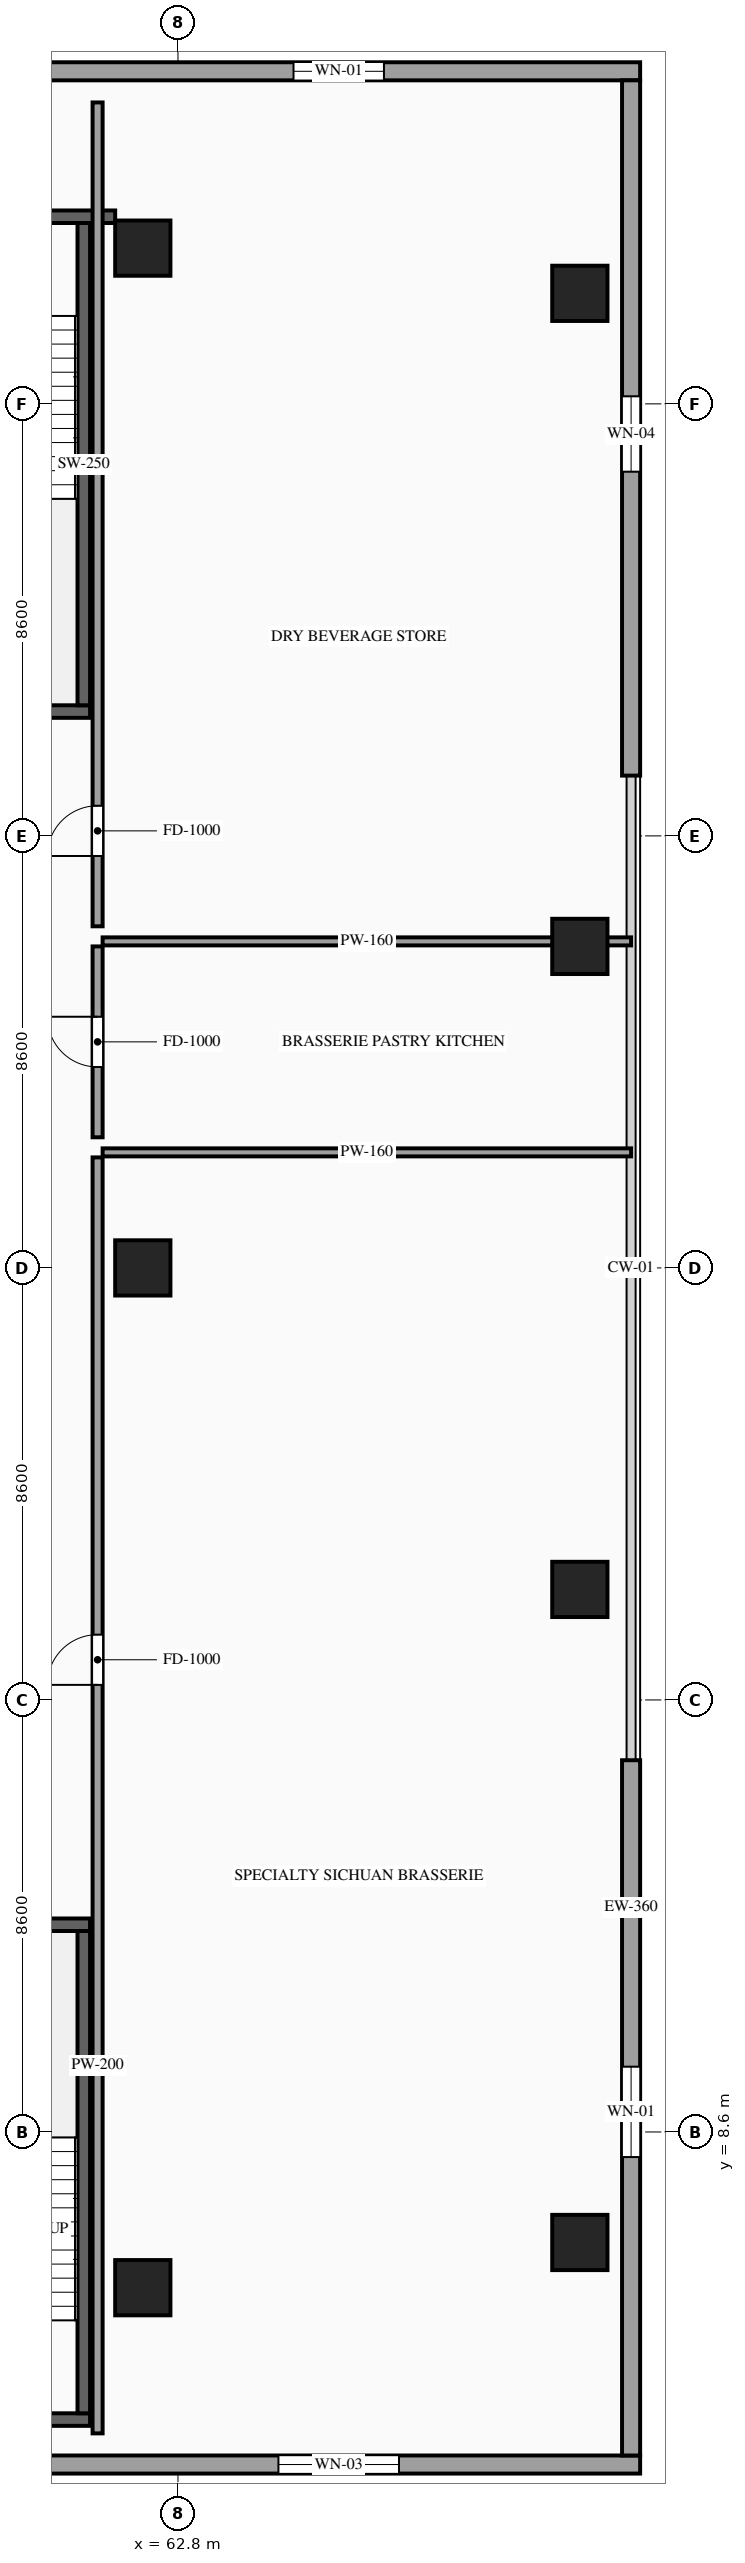
"""IFC4 building model, lengths in metres.
Left out: names, types, materials, properties, quantities, classifications, styles, units other than length and angle.
Written with IfcOpenShell. Run it as: python <this file> out.ifc"""

import sys

from ifc_helpers import new_model, si_unit, direction, frame, frame_2d, origin, origin_2d, place, context, subcontext, project, spatial, rectangle, extrude, source, transform, mapped, element, fill, save


model = new_model("IFC4")
c1 = context("Model", 3, precision=1e-05, world=origin(), true_north=direction((0.0, 1.0)))
c2 = subcontext(c1, "Body", "Model", "MODEL_VIEW")
j1 = project(units=[si_unit("LENGTHUNIT", "METRE"), si_unit("PLANEANGLEUNIT", "RADIAN")], contexts=[c1])
p1 = place(None, origin())
s1 = spatial("IfcSite", under=j1, at=p1, CompositionType="ELEMENT")
p2 = place(p1, origin())
s2 = spatial("IfcBuilding", under=s1, at=p2, CompositionType="ELEMENT")
p3 = place(p2, frame((0.0, 0.0, 10.2)))
s3 = spatial("IfcBuildingStorey", under=s2, at=p3, CompositionType="ELEMENT", Elevation=10.2)
m1 = source(origin(), c2, "Body", "SweptSolid", [
    extrude(rectangle(XDim=1.1, YDim=1.1, at=origin_2d()), origin(), (0.0, 0.0, 1.0), 4.8),
])
for number, where, z_axis, x_axis in (
    (1, (70.8, 6.4, 0.0), (0.0, 0.0, 1.0), (1.0, 0.0, 0.0)),
    (2, (70.8, 19.4, 0.0), (0.0, 0.0, 1.0), (1.0, 0.0, 0.0)),
    (3, (70.8, 32.2, 0.0), (0.0, 0.0, 1.0), (1.0, 0.0, 0.0)),
    (4, (70.8, 45.2, 0.0), (0.0, 0.0, 1.0), (1.0, 0.0, 0.0)),
    (5, (62.1, 5.5, 0.0), (0.0, 0.0, 1.0), (1.0, 0.0, 0.0)),
    (6, (62.1, 25.8, 0.0), (0.0, 0.0, 1.0), (1.0, 0.0, 0.0)),
    (7, (62.1, 46.1, 0.0), (0.0, 0.0, 1.0), (1.0, 0.0, 0.0)),
):
    element("IfcColumn", number, at=place(p3, frame(where, z_axis=z_axis, x_axis=x_axis)), inside=s3, PredefinedType="COLUMN", context=c2, shape_type="MappedRepresentation", body=[
        mapped(m1, transform((0.0, 0.0, 0.0), scale=1.0)),
    ])
p4 = place(p3, frame((59.07, 1.98, 0.0), z_axis=(0.0, 0.0, 1.0), x_axis=(1.0, 0.0, 0.0)))
e8 = element("IfcWall", 8, at=p4, inside=s3, PredefinedType="SOLIDWALL", context=c2, shape_type="SweptSolid", body=[
    extrude(rectangle(XDim=12.93, YDim=0.36, at=frame_2d((6.465, 0.0))), origin(), (0.0, 0.0, 1.0), 4.52),
])
p5 = place(p4, frame((5.73, 0.0, 0.85)))
e9 = element("IfcOpeningElement", 9, at=p5, cuts=e8, PredefinedType="OPENING", context=c2, shape_type="SweptSolid", body=[
    extrude(rectangle(XDim=2.4, YDim=2.4, at=frame_2d((1.2, 1.2))), frame((0.0, 0.195, 0.0), z_axis=(0.0, -1.0, 0.0), x_axis=(1.0, 0.0, 0.0)), (0.0, 0.0, 1.0), 0.39),
])
p6 = place(p3, frame((59.07, 49.62, 0.0), z_axis=(0.0, 0.0, 1.0), x_axis=(1.0, 0.0, 0.0)))
e10 = element("IfcWall", 10, at=p6, inside=s3, PredefinedType="SOLIDWALL", context=c2, shape_type="SweptSolid", body=[
    extrude(rectangle(XDim=12.93, YDim=0.36, at=frame_2d((6.465, 0.0))), origin(), (0.0, 0.0, 1.0), 4.52),
])
p7 = place(p6, frame((6.03, 0.0, 0.9)))
e11 = element("IfcOpeningElement", 11, at=p7, cuts=e10, PredefinedType="OPENING", context=c2, shape_type="SweptSolid", body=[
    extrude(rectangle(XDim=1.8, YDim=2.2, at=frame_2d((0.9, 1.1))), frame((0.0, 0.195, 0.0), z_axis=(0.0, -1.0, 0.0), x_axis=(1.0, 0.0, 0.0)), (0.0, 0.0, 1.0), 0.39),
])
p8 = place(p3, frame((71.82, 2.16, 0.0), z_axis=(0.0, 0.0, 1.0), x_axis=(0.0, 1.0, 0.0)))
e12 = element("IfcWall", 12, at=p8, inside=s3, PredefinedType="SOLIDWALL", context=c2, shape_type="SweptSolid", body=[
    extrude(rectangle(XDim=13.84, YDim=0.36, at=frame_2d((6.92, 0.0))), origin(), (0.0, 0.0, 1.0), 4.52),
])
p9 = place(p8, frame((5.94, 0.0, 0.9)))
e13 = element("IfcOpeningElement", 13, at=p9, cuts=e12, PredefinedType="OPENING", context=c2, shape_type="SweptSolid", body=[
    extrude(rectangle(XDim=1.8, YDim=2.2, at=frame_2d((0.9, 1.1))), frame((0.0, 0.195, 0.0), z_axis=(0.0, -1.0, 0.0), x_axis=(1.0, 0.0, 0.0)), (0.0, 0.0, 1.0), 0.39),
])
p10 = place(p3, frame((71.82, 35.6, 0.0), z_axis=(0.0, 0.0, 1.0), x_axis=(0.0, 1.0, 0.0)))
e14 = element("IfcWall", 14, at=p10, inside=s3, PredefinedType="SOLIDWALL", context=c2, shape_type="SweptSolid", body=[
    extrude(rectangle(XDim=13.84, YDim=0.36, at=frame_2d((6.92, 0.0))), origin(), (0.0, 0.0, 1.0), 4.52),
])
p11 = place(p10, frame((6.05, 0.0, 0.9)))
e15 = element("IfcOpeningElement", 15, at=p11, cuts=e14, PredefinedType="OPENING", context=c2, shape_type="SweptSolid", body=[
    extrude(rectangle(XDim=1.5, YDim=1.8, at=frame_2d((0.75, 0.9))), frame((0.0, 0.195, 0.0), z_axis=(0.0, -1.0, 0.0), x_axis=(1.0, 0.0, 0.0)), (0.0, 0.0, 1.0), 0.39),
])
m2 = source(origin(), c2, "Body", "SweptSolid", [
    extrude(rectangle(XDim=4.3, YDim=0.25, at=frame_2d((2.15, 0.0))), origin(), (0.0, 0.0, 1.0), 4.52),
])
for number, where, z_axis, x_axis in (
    (16, (56.75, 2.875, 0.0), (0.0, 0.0, 1.0), (1.0, 0.0, 0.0)),
    (17, (56.75, 12.725, 0.0), (0.0, 0.0, 1.0), (1.0, 0.0, 0.0)),
):
    element("IfcWall", number, at=place(p3, frame(where, z_axis=z_axis, x_axis=x_axis)), inside=s3, PredefinedType="SOLIDWALL", context=c2, shape_type="MappedRepresentation", body=[
        mapped(m2, transform((0.0, 0.0, 0.0), scale=1.0)),
    ])
m3 = source(origin(), c2, "Body", "SweptSolid", [
    extrude(rectangle(XDim=9.6, YDim=0.25, at=frame_2d((4.8, 0.0))), origin(), (0.0, 0.0, 1.0), 4.52),
])
p12 = place(p3, frame((60.925, 3.0, 0.0), z_axis=(0.0, 0.0, 1.0), x_axis=(0.0, 1.0, 0.0)))
e18 = element("IfcWall", 18, at=p12, inside=s3, PredefinedType="SOLIDWALL", context=c2, shape_type="MappedRepresentation", body=[
    mapped(m3, transform((0.0, 0.0, 0.0), scale=1.0)),
])
p13 = place(p3, frame((56.75, 36.875, 0.0), z_axis=(0.0, 0.0, 1.0), x_axis=(1.0, 0.0, 0.0)))
e19 = element("IfcWall", 19, at=p13, inside=s3, PredefinedType="SOLIDWALL", context=c2, shape_type="MappedRepresentation", body=[
    mapped(m2, transform((0.0, 0.0, 0.0), scale=1.0)),
])
m4 = source(origin(), c2, "Body", "SweptSolid", [
    extrude(rectangle(XDim=4.8, YDim=0.25, at=frame_2d((2.4, 0.0))), origin(), (0.0, 0.0, 1.0), 4.52),
])
p14 = place(p3, frame((56.75, 46.725, 0.0), z_axis=(0.0, 0.0, 1.0), x_axis=(1.0, 0.0, 0.0)))
e20 = element("IfcWall", 20, at=p14, inside=s3, PredefinedType="SOLIDWALL", context=c2, shape_type="MappedRepresentation", body=[
    mapped(m4, transform((0.0, 0.0, 0.0), scale=1.0)),
])
p15 = place(p3, frame((60.925, 37.0, 0.0), z_axis=(0.0, 0.0, 1.0), x_axis=(0.0, 1.0, 0.0)))
e21 = element("IfcWall", 21, at=p15, inside=s3, PredefinedType="SOLIDWALL", context=c2, shape_type="MappedRepresentation", body=[
    mapped(m3, transform((0.0, 0.0, 0.0), scale=1.0)),
])
p16 = place(p3, frame((61.2, 2.6, 0.0), z_axis=(0.0, 0.0, 1.0), x_axis=(0.0, 1.0, 0.0)))
e22 = element("IfcWall", 22, at=p16, inside=s3, PredefinedType="PARTITIONING", context=c2, shape_type="SweptSolid", body=[
    extrude(rectangle(XDim=25.4, YDim=0.2, at=frame_2d((12.7, 0.0))), origin(), (0.0, 0.0, 1.0), 4.52),
])
p17 = place(p16, frame((14.9, 0.0, 0.0)))
e23 = element("IfcOpeningElement", 23, at=p17, cuts=e22, PredefinedType="OPENING", context=c2, shape_type="SweptSolid", body=[
    extrude(rectangle(XDim=1.0, YDim=2.2, at=frame_2d((0.5, 1.1))), frame((0.0, 0.115, 0.0), z_axis=(0.0, -1.0, 0.0), x_axis=(1.0, 0.0, 0.0)), (0.0, 0.0, 1.0), 0.23),
])
m5 = source(origin(), c2, "Body", "SweptSolid", [
    extrude(rectangle(XDim=10.52, YDim=0.16, at=frame_2d((5.26, 0.0))), origin(), (0.0, 0.0, 1.0), 4.52),
])
p18 = place(p3, frame((61.3, 28.1, 0.0), z_axis=(0.0, 0.0, 1.0), x_axis=(1.0, 0.0, 0.0)))
e24 = element("IfcWall", 24, at=p18, inside=s3, PredefinedType="PARTITIONING", context=c2, shape_type="MappedRepresentation", body=[
    mapped(m5, transform((0.0, 0.0, 0.0), scale=1.0)),
])
p19 = place(p3, frame((61.2, 28.4, 0.0), z_axis=(0.0, 0.0, 1.0), x_axis=(0.0, 1.0, 0.0)))
e25 = element("IfcWall", 25, at=p19, inside=s3, PredefinedType="PARTITIONING", context=c2, shape_type="SweptSolid", body=[
    extrude(rectangle(XDim=3.8, YDim=0.2, at=frame_2d((1.9, 0.0))), origin(), (0.0, 0.0, 1.0), 4.52),
])
p20 = place(p19, frame((1.4, 0.0, 0.0)))
e26 = element("IfcOpeningElement", 26, at=p20, cuts=e25, PredefinedType="OPENING", context=c2, shape_type="SweptSolid", body=[
    extrude(rectangle(XDim=1.0, YDim=2.2, at=frame_2d((0.5, 1.1))), frame((0.0, 0.115, 0.0), z_axis=(0.0, -1.0, 0.0), x_axis=(1.0, 0.0, 0.0)), (0.0, 0.0, 1.0), 0.23),
])
m6 = source(origin(), c2, "Body", "SweptSolid", [
    extrude(rectangle(XDim=10.52, YDim=0.16, at=frame_2d((5.26, 0.0))), origin(), (0.0, 0.0, 1.0), 4.215),
])
p21 = place(p3, frame((61.3, 32.3, 0.0), z_axis=(0.0, 0.0, 1.0), x_axis=(1.0, 0.0, 0.0)))
e27 = element("IfcWall", 27, at=p21, inside=s3, PredefinedType="PARTITIONING", context=c2, shape_type="MappedRepresentation", body=[
    mapped(m6, transform((0.0, 0.0, 0.0), scale=1.0)),
])
p22 = place(p3, frame((61.2, 32.6, 0.0), z_axis=(0.0, 0.0, 1.0), x_axis=(0.0, 1.0, 0.0)))
e28 = element("IfcWall", 28, at=p22, inside=s3, PredefinedType="PARTITIONING", context=c2, shape_type="SweptSolid", body=[
    extrude(rectangle(XDim=16.4, YDim=0.2, at=frame_2d((8.2, 0.0))), origin(), (0.0, 0.0, 1.0), 4.52),
])
p23 = place(p22, frame((1.4, 0.0, 0.0)))
e29 = element("IfcOpeningElement", 29, at=p23, cuts=e28, PredefinedType="OPENING", context=c2, shape_type="SweptSolid", body=[
    extrude(rectangle(XDim=1.0, YDim=2.2, at=frame_2d((0.5, 1.1))), frame((0.0, 0.115, 0.0), z_axis=(0.0, -1.0, 0.0), x_axis=(1.0, 0.0, 0.0)), (0.0, 0.0, 1.0), 0.23),
])
m7 = source(origin(), c2, "Body", "SweptSolid", [
    extrude(rectangle(XDim=2.4, YDim=2.4, at=frame_2d((1.2, 1.2))), frame((0.0, 0.03, 0.0), z_axis=(0.0, -1.0, 0.0), x_axis=(1.0, 0.0, 0.0)), (0.0, 0.0, 1.0), 0.06),
])
p24 = place(p5, origin())
e30 = element("IfcWindow", 30, at=p24, inside=s3, PartitioningType="SINGLE_PANEL", PredefinedType="WINDOW", context=c2, shape_type="MappedRepresentation", body=[
    mapped(m7, transform((0.0, 0.0, 0.0), scale=1.0)),
])
fill(e9, e30)
m8 = source(origin(), c2, "Body", "SweptSolid", [
    extrude(rectangle(XDim=1.8, YDim=2.2, at=frame_2d((0.9, 1.1))), frame((0.0, 0.03, 0.0), z_axis=(0.0, -1.0, 0.0), x_axis=(1.0, 0.0, 0.0)), (0.0, 0.0, 1.0), 0.06),
])
p25 = place(p7, origin())
e31 = element("IfcWindow", 31, at=p25, inside=s3, PartitioningType="SINGLE_PANEL", PredefinedType="WINDOW", context=c2, shape_type="MappedRepresentation", body=[
    mapped(m8, transform((0.0, 0.0, 0.0), scale=1.0)),
])
fill(e11, e31)
p26 = place(p9, origin())
e32 = element("IfcWindow", 32, at=p26, inside=s3, PartitioningType="SINGLE_PANEL", PredefinedType="WINDOW", context=c2, shape_type="MappedRepresentation", body=[
    mapped(m8, transform((0.0, 0.0, 0.0), scale=1.0)),
])
fill(e13, e32)
m9 = source(origin(), c2, "Body", "SweptSolid", [
    extrude(rectangle(XDim=1.5, YDim=1.8, at=frame_2d((0.75, 0.9))), frame((0.0, 0.03, 0.0), z_axis=(0.0, -1.0, 0.0), x_axis=(1.0, 0.0, 0.0)), (0.0, 0.0, 1.0), 0.06),
])
p27 = place(p11, origin())
e33 = element("IfcWindow", 33, at=p27, inside=s3, PartitioningType="SINGLE_PANEL", PredefinedType="WINDOW", context=c2, shape_type="MappedRepresentation", body=[
    mapped(m9, transform((0.0, 0.0, 0.0), scale=1.0)),
])
fill(e15, e33)
m10 = source(origin(), c2, "Body", "SweptSolid", [
    extrude(rectangle(XDim=1.0, YDim=2.2, at=frame_2d((0.5, 1.1))), frame((0.0, 0.025, 0.0), z_axis=(0.0, -1.0, 0.0), x_axis=(1.0, 0.0, 0.0)), (0.0, 0.0, 1.0), 0.05),
])
p28 = place(p17, origin())
e34 = element("IfcDoor", 34, at=p28, inside=s3, OperationType="SINGLE_SWING_LEFT", PredefinedType="DOOR", context=c2, shape_type="MappedRepresentation", body=[
    mapped(m10, transform((0.0, 0.0, 0.0), scale=1.0)),
])
fill(e23, e34)
p29 = place(p20, origin())
e35 = element("IfcDoor", 35, at=p29, inside=s3, OperationType="SINGLE_SWING_RIGHT", PredefinedType="DOOR", context=c2, shape_type="MappedRepresentation", body=[
    mapped(m10, transform((0.0, 0.0, 0.0), scale=1.0)),
])
fill(e26, e35)
p30 = place(p23, origin())
e36 = element("IfcDoor", 36, at=p30, inside=s3, OperationType="SINGLE_SWING_LEFT", PredefinedType="DOOR", context=c2, shape_type="MappedRepresentation", body=[
    mapped(m10, transform((0.0, 0.0, 0.0), scale=1.0)),
])
fill(e29, e36)
save(model, sys.argv[1])
